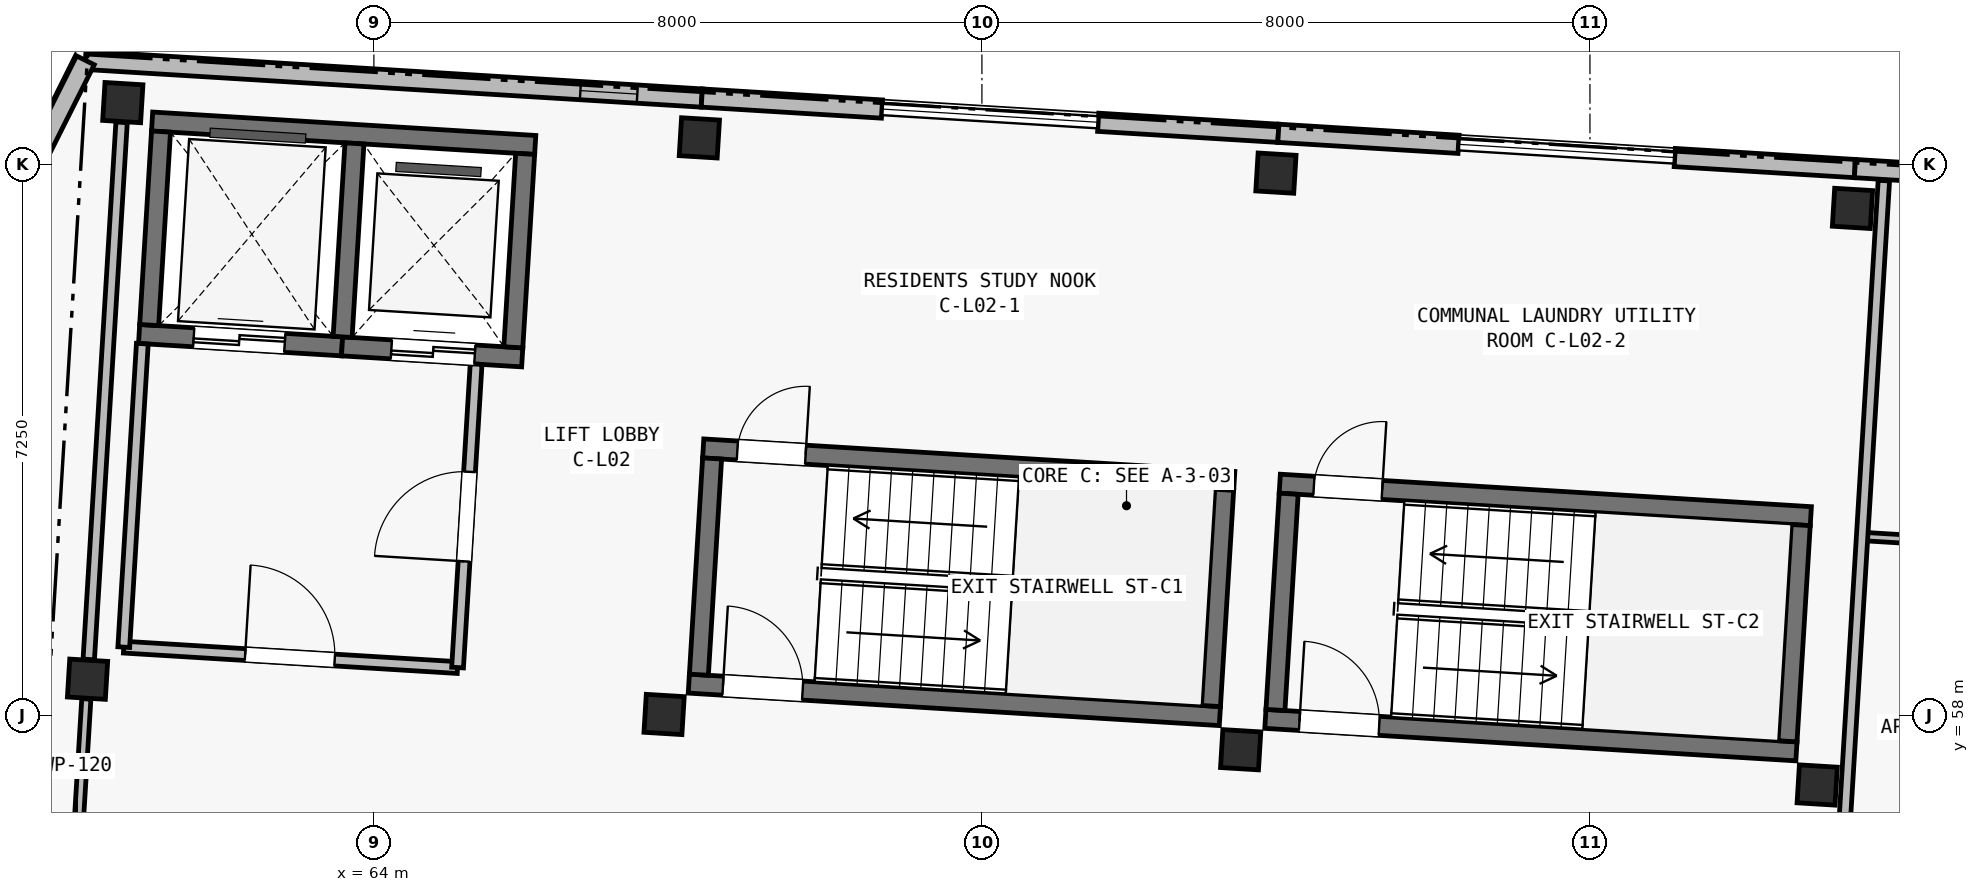
"""IFC4 building model, lengths in metres.
Left out: names, types, materials, properties, quantities, classifications, styles, units other than length and angle.
Written with IfcOpenShell. Run it as: python <this file> out.ifc"""

import sys

from ifc_helpers import new_model, si_unit, direction, frame, frame_2d, origin, origin_2d, place, context, subcontext, project, spatial, rectangle, extrude, element, fill, save


model = new_model("IFC4")
c1 = context("Model", 3, precision=1e-05, world=origin(), true_north=direction((0.0, 1.0)))
c2 = subcontext(c1, "Body", "Model", "MODEL_VIEW")
j1 = project(units=[si_unit("LENGTHUNIT", "METRE"), si_unit("PLANEANGLEUNIT", "RADIAN")], contexts=[c1])
p1 = place(None, origin())
s1 = spatial("IfcSite", under=j1, at=p1, CompositionType="ELEMENT")
p2 = place(p1, origin())
s2 = spatial("IfcBuilding", under=s1, at=p2, CompositionType="ELEMENT")
p3 = place(p2, frame((0.0, 0.0, 8.4)))
s3 = spatial("IfcBuildingStorey", under=s2, at=p3, CompositionType="ELEMENT", Elevation=8.4)
for number, where, z_axis, x_axis in (
    (1, (60.233, 58.478, 0.0), (0.0, 0.0, 1.0), (0.998, -0.061, 0.0)),
    (2, (60.697, 66.063, 0.0), (0.0, 0.0, 1.0), (0.998, -0.061, 0.0)),
    (3, (67.818, 58.014, 0.0), (0.0, 0.0, 1.0), (0.998, -0.061, 0.0)),
    (4, (68.282, 65.599, 0.0), (0.0, 0.0, 1.0), (0.998, -0.061, 0.0)),
    (5, (75.404, 57.55, 0.0), (0.0, 0.0, 1.0), (0.998, -0.061, 0.0)),
    (6, (75.868, 65.135, 0.0), (0.0, 0.0, 1.0), (0.998, -0.061, 0.0)),
    (7, (82.99, 57.086, 0.0), (0.0, 0.0, 1.0), (0.998, -0.061, 0.0)),
    (8, (83.454, 64.672, 0.0), (0.0, 0.0, 1.0), (0.998, -0.061, 0.0)),
):
    element("IfcColumn", number, at=place(p3, frame(where, z_axis=z_axis, x_axis=x_axis)), inside=s3, PredefinedType="COLUMN", context=c2, shape_type="SweptSolid", body=[
        extrude(rectangle(XDim=0.5, YDim=0.5, at=origin_2d()), origin(), (0.0, 0.0, 1.0), 3.25),
    ])
p4 = place(p3, frame((61.082, 65.814, 0.0), z_axis=(0.0, 0.0, 1.0), x_axis=(0.998134101522, -0.061059932685, 0.0)))
e9 = element("IfcWall", 9, at=p4, inside=s3, PredefinedType="SHEAR", context=c2, shape_type="SweptSolid", body=[
    extrude(rectangle(XDim=5.05, YDim=0.25, at=frame_2d((2.525, 0.0))), origin(), (0.0, 0.0, 1.0), 3.25),
])
p5 = place(p3, frame((60.911, 63.02, 0.0), z_axis=(0.0, 0.0, 1.0), x_axis=(0.998134099905, -0.061059959111, 0.0)))
e10 = element("IfcWall", 10, at=p5, inside=s3, PredefinedType="SHEAR", context=c2, shape_type="SweptSolid", body=[
    extrude(rectangle(XDim=2.675, YDim=0.25, at=frame_2d((1.337, 0.0))), origin(), (0.0, 0.0, 1.0), 3.25),
])
p6 = place(p5, frame((0.72, 0.0, 0.0)))
e11 = element("IfcOpeningElement", 11, at=p6, cuts=e10, PredefinedType="OPENING", context=c2, shape_type="SweptSolid", body=[
    extrude(rectangle(XDim=1.2, YDim=2.2, at=frame_2d((0.6, 1.1))), frame((0.0, 0.14, 0.0), z_axis=(0.0, -1.0, 0.0), x_axis=(1.0, 0.0, 0.0)), (0.0, 0.0, 1.0), 0.28),
])
p7 = place(p3, frame((63.581, 62.856, 0.0), z_axis=(0.0, 0.0, 1.0), x_axis=(0.998134103342, -0.061059902923, 0.0)))
e12 = element("IfcWall", 12, at=p7, inside=s3, PredefinedType="SHEAR", context=c2, shape_type="SweptSolid", body=[
    extrude(rectangle(XDim=2.375, YDim=0.25, at=frame_2d((1.188, 0.0))), origin(), (0.0, 0.0, 1.0), 3.25),
])
p8 = place(p7, frame((0.65, 0.0, 0.0)))
e13 = element("IfcOpeningElement", 13, at=p8, cuts=e12, PredefinedType="OPENING", context=c2, shape_type="SweptSolid", body=[
    extrude(rectangle(XDim=1.1, YDim=2.15, at=frame_2d((0.55, 1.075))), frame((0.0, 0.14, 0.0), z_axis=(0.0, -1.0, 0.0), x_axis=(1.0, 0.0, 0.0)), (0.0, 0.0, 1.0), 0.28),
])
p9 = place(p3, frame((61.043, 63.137, 0.0), z_axis=(0.0, 0.0, 1.0), x_axis=(0.061078919587, 0.998132939834, 0.0)))
e14 = element("IfcWall", 14, at=p9, inside=s3, PredefinedType="SHEAR", context=c2, shape_type="SweptSolid", body=[
    extrude(rectangle(XDim=2.55, YDim=0.25, at=frame_2d((1.275, 0.0))), origin(), (0.0, 0.0, 1.0), 3.25),
])
p10 = place(p3, frame((63.589, 62.981, 0.0), z_axis=(0.0, 0.0, 1.0), x_axis=(0.060989368901, 0.998138415692, 0.0)))
e15 = element("IfcWall", 15, at=p10, inside=s3, PredefinedType="SHEAR", context=c2, shape_type="SweptSolid", body=[
    extrude(rectangle(XDim=2.55, YDim=0.25, at=frame_2d((1.275, 0.0))), origin(), (0.0, 0.0, 1.0), 3.25),
])
p11 = place(p3, frame((65.834, 62.844, 0.0), z_axis=(0.0, 0.0, 1.0), x_axis=(0.061084756616, 0.998132582631, 0.0)))
e16 = element("IfcWall", 16, at=p11, inside=s3, PredefinedType="SHEAR", context=c2, shape_type="SweptSolid", body=[
    extrude(rectangle(XDim=2.55, YDim=0.25, at=frame_2d((1.275, 0.0))), origin(), (0.0, 0.0, 1.0), 3.25),
])
p12 = place(p3, frame((68.333, 61.514, 0.0), z_axis=(0.0, 0.0, 1.0), x_axis=(0.998135676081, -0.061034188237, 0.0)))
e17 = element("IfcWall", 17, at=p12, inside=s3, PredefinedType="SHEAR", context=c2, shape_type="SweptSolid", body=[
    extrude(rectangle(XDim=7.0, YDim=0.25, at=frame_2d((3.5, 0.0))), origin(), (0.0, 0.0, 1.0), 3.25),
])
p13 = place(p12, frame((0.45, 0.0, 0.0)))
e18 = element("IfcOpeningElement", 18, at=p13, cuts=e17, PredefinedType="OPENING", context=c2, shape_type="SweptSolid", body=[
    extrude(rectangle(XDim=0.9, YDim=2.1, at=frame_2d((0.45, 1.05))), frame((0.0, 0.14, 0.0), z_axis=(0.0, -1.0, 0.0), x_axis=(1.0, 0.0, 0.0)), (0.0, 0.0, 1.0), 0.28),
])
p14 = place(p3, frame((68.144, 58.419, 0.0), z_axis=(0.0, 0.0, 1.0), x_axis=(0.998135546153, -0.061036313012, 0.0)))
e19 = element("IfcWall", 19, at=p14, inside=s3, PredefinedType="SHEAR", context=c2, shape_type="SweptSolid", body=[
    extrude(rectangle(XDim=7.0, YDim=0.25, at=frame_2d((3.5, 0.0))), origin(), (0.0, 0.0, 1.0), 3.25),
])
p15 = place(p14, frame((0.45, 0.0, 0.0)))
e20 = element("IfcOpeningElement", 20, at=p15, cuts=e19, PredefinedType="OPENING", context=c2, shape_type="SweptSolid", body=[
    extrude(rectangle(XDim=1.05, YDim=2.15, at=frame_2d((0.525, 1.075))), frame((0.0, 0.14, 0.0), z_axis=(0.0, -1.0, 0.0), x_axis=(1.0, 0.0, 0.0)), (0.0, 0.0, 1.0), 0.28),
])
for number, where, z_axis, x_axis in (
    (21, (68.276, 58.537, 0.0), (0.0, 0.0, 1.0), (0.061, 0.998, 0.0)),
    (22, (75.014, 58.125, 0.0), (0.0, 0.0, 1.0), (0.061, 0.998, 0.0)),
):
    element("IfcWall", number, at=place(p3, frame(where, z_axis=z_axis, x_axis=x_axis)), inside=s3, PredefinedType="SHEAR", context=c2, shape_type="SweptSolid", body=[
        extrude(rectangle(XDim=2.85, YDim=0.25, at=frame_2d((1.425, 0.0))), origin(), (0.0, 0.0, 1.0), 3.25),
    ])
p16 = place(p3, frame((75.919, 61.05, 0.0), z_axis=(0.0, 0.0, 1.0), x_axis=(0.998135546153, -0.061036313012, 0.0)))
e23 = element("IfcWall", 23, at=p16, inside=s3, PredefinedType="SHEAR", context=c2, shape_type="SweptSolid", body=[
    extrude(rectangle(XDim=7.0, YDim=0.25, at=frame_2d((3.5, 0.0))), origin(), (0.0, 0.0, 1.0), 3.25),
])
p17 = place(p16, frame((0.45, 0.0, 0.0)))
e24 = element("IfcOpeningElement", 24, at=p17, cuts=e23, PredefinedType="OPENING", context=c2, shape_type="SweptSolid", body=[
    extrude(rectangle(XDim=0.9, YDim=2.1, at=frame_2d((0.45, 1.05))), frame((0.0, 0.14, 0.0), z_axis=(0.0, -1.0, 0.0), x_axis=(1.0, 0.0, 0.0)), (0.0, 0.0, 1.0), 0.28),
])
p18 = place(p3, frame((75.73, 57.956, 0.0), z_axis=(0.0, 0.0, 1.0), x_axis=(0.998135546153, -0.061036313012, 0.0)))
e25 = element("IfcWall", 25, at=p18, inside=s3, PredefinedType="SHEAR", context=c2, shape_type="SweptSolid", body=[
    extrude(rectangle(XDim=7.0, YDim=0.25, at=frame_2d((3.5, 0.0))), origin(), (0.0, 0.0, 1.0), 3.25),
])
p19 = place(p18, frame((0.45, 0.0, 0.0)))
e26 = element("IfcOpeningElement", 26, at=p19, cuts=e25, PredefinedType="OPENING", context=c2, shape_type="SweptSolid", body=[
    extrude(rectangle(XDim=1.05, YDim=2.15, at=frame_2d((0.525, 1.075))), frame((0.0, 0.14, 0.0), z_axis=(0.0, -1.0, 0.0), x_axis=(1.0, 0.0, 0.0)), (0.0, 0.0, 1.0), 0.28),
])
for number, where, z_axis, x_axis in (
    (27, (75.862, 58.073, 0.0), (0.0, 0.0, 1.0), (0.061, 0.998, 0.0)),
    (28, (82.599, 57.661, 0.0), (0.0, 0.0, 1.0), (0.061, 0.998, 0.0)),
):
    element("IfcWall", number, at=place(p3, frame(where, z_axis=z_axis, x_axis=x_axis)), inside=s3, PredefinedType="SHEAR", context=c2, shape_type="SweptSolid", body=[
        extrude(rectangle(XDim=2.85, YDim=0.25, at=frame_2d((1.425, 0.0))), origin(), (0.0, 0.0, 1.0), 3.25),
    ])
p20 = place(p3, frame((60.205, 66.62, 0.0), z_axis=(0.0, 0.0, 1.0), x_axis=(0.998134248939, -0.061057522844, 0.0)))
e29 = element("IfcWall", 29, at=p20, inside=s3, PredefinedType="SOLIDWALL", context=c2, shape_type="SweptSolid", body=[
    extrude(rectangle(XDim=8.125, YDim=0.24, at=frame_2d((4.062, 0.0))), origin(), (0.0, 0.0, 1.0), 3.0),
])
p21 = place(p20, frame((6.525, 0.0, 0.45)))
e30 = element("IfcOpeningElement", 30, at=p21, cuts=e29, PredefinedType="OPENING", context=c2, shape_type="SweptSolid", body=[
    extrude(rectangle(XDim=0.75, YDim=2.32, at=frame_2d((0.375, 1.16))), frame((0.0, 0.135, 0.0), z_axis=(0.0, -1.0, 0.0), x_axis=(1.0, 0.0, 0.0)), (0.0, 0.0, 1.0), 0.27),
])
p22 = place(p3, frame((68.314, 66.124, 0.0), z_axis=(0.0, 0.0, 1.0), x_axis=(0.998134103342, -0.061059902923, 0.0)))
e31 = element("IfcWall", 31, at=p22, inside=s3, PredefinedType="SOLIDWALL", context=c2, shape_type="SweptSolid", body=[
    extrude(rectangle(XDim=2.375, YDim=0.24, at=frame_2d((1.188, 0.0))), origin(), (0.0, 0.0, 1.0), 3.0),
])
p23 = place(p3, frame((73.53, 65.804, 0.0), z_axis=(0.0, 0.0, 1.0), x_axis=(0.998133720034, -0.061066168473, 0.0)))
e32 = element("IfcWall", 32, at=p23, inside=s3, PredefinedType="SOLIDWALL", context=c2, shape_type="SweptSolid", body=[
    extrude(rectangle(XDim=2.375, YDim=0.24, at=frame_2d((1.188, 0.0))), origin(), (0.0, 0.0, 1.0), 3.0),
])
for number, where, z_axis, x_axis in (
    (33, (75.9, 65.659, 0.0), (0.0, 0.0, 1.0), (0.998, -0.061, 0.0)),
    (34, (81.115, 65.341, 0.0), (0.0, 0.0, 1.0), (0.998, -0.061, 0.0)),
):
    element("IfcWall", number, at=place(p3, frame(where, z_axis=z_axis, x_axis=x_axis)), inside=s3, PredefinedType="SOLIDWALL", context=c2, shape_type="SweptSolid", body=[
        extrude(rectangle(XDim=2.375, YDim=0.24, at=frame_2d((1.188, 0.0))), origin(), (0.0, 0.0, 1.0), 3.0),
    ])
p24 = place(p3, frame((83.486, 65.196, 0.0), z_axis=(0.0, 0.0, 1.0), x_axis=(0.998135669243, -0.061034300063, 0.0)))
e35 = element("IfcWall", 35, at=p24, inside=s3, PredefinedType="SOLIDWALL", context=c2, shape_type="SweptSolid", body=[
    extrude(rectangle(XDim=7.6, YDim=0.24, at=frame_2d((3.8, 0.0))), origin(), (0.0, 0.0, 1.0), 3.0),
])
p25 = place(p24, frame((1.807, 0.0, 0.5)))
e36 = element("IfcOpeningElement", 36, at=p25, cuts=e35, PredefinedType="OPENING", context=c2, shape_type="SweptSolid", body=[
    extrude(rectangle(XDim=0.74, YDim=2.26, at=frame_2d((0.37, 1.13))), frame((0.0, 0.135, 0.0), z_axis=(0.0, -1.0, 0.0), x_axis=(1.0, 0.0, 0.0)), (0.0, 0.0, 1.0), 0.27),
])
p26 = place(p24, frame((5.006, 0.0, 0.44)))
e37 = element("IfcOpeningElement", 37, at=p26, cuts=e35, PredefinedType="OPENING", context=c2, shape_type="SweptSolid", body=[
    extrude(rectangle(XDim=0.82, YDim=2.18, at=frame_2d((0.41, 1.09))), frame((0.0, 0.135, 0.0), z_axis=(0.0, -1.0, 0.0), x_axis=(1.0, 0.0, 0.0)), (0.0, 0.0, 1.0), 0.27),
])
p27 = place(p3, frame((51.654, 49.585, 0.0), z_axis=(0.0, 0.0, 1.0), x_axis=(0.448621989068, 0.893721607059, 0.0)))
e38 = element("IfcWall", 38, at=p27, inside=s3, PredefinedType="SOLIDWALL", context=c2, shape_type="SweptSolid", body=[
    extrude(rectangle(XDim=19.061, YDim=0.26, at=frame_2d((9.53, 0.0))), origin(), (0.0, 0.0, 1.0), 3.0),
])
p28 = place(p27, frame((2.81, 0.0, 0.45)))
e39 = element("IfcOpeningElement", 39, at=p28, cuts=e38, PredefinedType="OPENING", context=c2, shape_type="SweptSolid", body=[
    extrude(rectangle(XDim=0.64, YDim=2.18, at=frame_2d((0.32, 1.09))), frame((0.0, 0.145, 0.0), z_axis=(0.0, -1.0, 0.0), x_axis=(1.0, 0.0, 0.0)), (0.0, 0.0, 1.0), 0.29),
])
p29 = place(p27, frame((15.47, 0.0, 0.52)))
e40 = element("IfcOpeningElement", 40, at=p29, cuts=e38, PredefinedType="OPENING", context=c2, shape_type="SweptSolid", body=[
    extrude(rectangle(XDim=0.78, YDim=2.2, at=frame_2d((0.39, 1.1))), frame((0.0, 0.145, 0.0), z_axis=(0.0, -1.0, 0.0), x_axis=(1.0, 0.0, 0.0)), (0.0, 0.0, 1.0), 0.29),
])
p30 = place(p3, frame((60.709, 58.899, 0.0), z_axis=(0.0, 0.0, 1.0), x_axis=(0.998132276607, -0.061089756882, 0.0)))
e41 = element("IfcWall", 41, at=p30, inside=s3, PredefinedType="PARTITIONING", context=c2, shape_type="SweptSolid", body=[
    extrude(rectangle(XDim=4.4, YDim=0.155, at=frame_2d((2.2, 0.0))), origin(), (0.0, 0.0, 1.0), 2.97),
])
p31 = place(p30, frame((1.6, 0.0, 0.0)))
e42 = element("IfcOpeningElement", 42, at=p31, cuts=e41, PredefinedType="OPENING", context=c2, shape_type="SweptSolid", body=[
    extrude(rectangle(XDim=1.18, YDim=2.15, at=frame_2d((0.59, 1.075))), frame((0.0, 0.093, 0.0), z_axis=(0.0, -1.0, 0.0), x_axis=(1.0, 0.0, 0.0)), (0.0, 0.0, 1.0), 0.185),
])
p32 = place(p3, frame((60.709, 58.899, 0.0), z_axis=(0.0, 0.0, 1.0), x_axis=(0.061036844229, 0.998135513669, 0.0)))
e43 = element("IfcWall", 43, at=p32, inside=s3, PredefinedType="PARTITIONING", context=c2, shape_type="SweptSolid", body=[
    extrude(rectangle(XDim=4.0, YDim=0.155, at=frame_2d((2.0, 0.0))), origin(), (0.0, 0.0, 1.0), 2.97),
])
p33 = place(p3, frame((65.101, 58.631, 0.0), z_axis=(0.0, 0.0, 1.0), x_axis=(0.061033125904, 0.99813574104, 0.0)))
e44 = element("IfcWall", 44, at=p33, inside=s3, PredefinedType="PARTITIONING", context=c2, shape_type="SweptSolid", body=[
    extrude(rectangle(XDim=4.0, YDim=0.155, at=frame_2d((2.0, 0.0))), origin(), (0.0, 0.0, 1.0), 2.97),
])
p34 = place(p33, frame((1.4, 0.0, 0.0)))
e45 = element("IfcOpeningElement", 45, at=p34, cuts=e44, PredefinedType="OPENING", context=c2, shape_type="SweptSolid", body=[
    extrude(rectangle(XDim=1.18, YDim=2.15, at=frame_2d((0.59, 1.075))), frame((0.0, 0.093, 0.0), z_axis=(0.0, -1.0, 0.0), x_axis=(1.0, 0.0, 0.0)), (0.0, 0.0, 1.0), 0.185),
])
p35 = place(p3, frame((59.98, 54.345, 0.0), z_axis=(0.0, 0.0, 1.0), x_axis=(0.061101107425, 0.998131581843, 0.0)))
e46 = element("IfcWall", 46, at=p35, inside=s3, PredefinedType="PARTITIONING", context=c2, shape_type="SweptSolid", body=[
    extrude(rectangle(XDim=3.88, YDim=0.12, at=frame_2d((1.94, 0.0))), origin(), (0.0, 0.0, 1.0), 2.5),
])
p36 = place(p35, frame((1.35, 0.0, 0.0)))
e47 = element("IfcOpeningElement", 47, at=p36, cuts=e46, PredefinedType="OPENING", context=c2, shape_type="SweptSolid", body=[
    extrude(rectangle(XDim=0.88, YDim=2.1, at=frame_2d((0.44, 1.05))), frame((0.0, 0.075, 0.0), z_axis=(0.0, -1.0, 0.0), x_axis=(1.0, 0.0, 0.0)), (0.0, 0.0, 1.0), 0.15),
])
p37 = place(p3, frame((60.249, 58.737, 0.0), z_axis=(0.0, 0.0, 1.0), x_axis=(0.061034344288, 0.998135666539, 0.0)))
e48 = element("IfcWall", 48, at=p37, inside=s3, PredefinedType="PARTITIONING", context=c2, shape_type="SweptSolid", body=[
    extrude(rectangle(XDim=7.08, YDim=0.15, at=frame_2d((3.54, 0.0))), origin(), (0.0, 0.0, 1.0), 2.5),
])
p38 = place(p3, frame((83.581, 60.356, 0.0), z_axis=(0.0, 0.0, 1.0), x_axis=(0.998133350094, -0.061072214879, 0.0)))
e49 = element("IfcWall", 49, at=p38, inside=s3, PredefinedType="PARTITIONING", context=c2, shape_type="SweptSolid", body=[
    extrude(rectangle(XDim=3.41, YDim=0.11, at=frame_2d((1.705, 0.0))), origin(), (0.0, 0.0, 1.0), 2.97),
])
p39 = place(p38, frame((1.255, 0.0, 0.0)))
e50 = element("IfcOpeningElement", 50, at=p39, cuts=e49, PredefinedType="OPENING", context=c2, shape_type="SweptSolid", body=[
    extrude(rectangle(XDim=0.9, YDim=2.1, at=frame_2d((0.45, 1.05))), frame((0.0, 0.07, 0.0), z_axis=(0.0, -1.0, 0.0), x_axis=(1.0, 0.0, 0.0)), (0.0, 0.0, 1.0), 0.14),
])
p40 = place(p3, frame((83.265, 55.185, 0.0), z_axis=(0.0, 0.0, 1.0), x_axis=(0.061046193261, 0.998134941923, 0.0)))
e51 = element("IfcWall", 51, at=p40, inside=s3, PredefinedType="PARTITIONING", context=c2, shape_type="SweptSolid", body=[
    extrude(rectangle(XDim=9.87, YDim=0.15, at=frame_2d((4.935, 0.0))), origin(), (0.0, 0.0, 1.0), 2.97),
])
p41 = place(p21, origin())
e52 = element("IfcWindow", 52, at=p41, inside=s3, PartitioningType="SINGLE_PANEL", PredefinedType="WINDOW", context=c2, shape_type="SweptSolid", body=[
    extrude(rectangle(XDim=0.75, YDim=2.32, at=frame_2d((0.375, 1.16))), frame((0.0, 0.03, 0.0), z_axis=(0.0, -1.0, 0.0), x_axis=(1.0, 0.0, 0.0)), (0.0, 0.0, 1.0), 0.06),
])
fill(e30, e52)
p42 = place(p31, origin())
e53 = element("IfcDoor", 53, at=p42, inside=s3, OperationType="SINGLE_SWING_LEFT", PredefinedType="DOOR", context=c2, shape_type="SweptSolid", body=[
    extrude(rectangle(XDim=1.18, YDim=2.15, at=frame_2d((0.59, 1.075))), frame((0.0, 0.025, 0.0), z_axis=(0.0, -1.0, 0.0), x_axis=(1.0, 0.0, 0.0)), (0.0, 0.0, 1.0), 0.05),
])
fill(e42, e53)
p43 = place(p34, origin())
e54 = element("IfcDoor", 54, at=p43, inside=s3, OperationType="SINGLE_SWING_LEFT", PredefinedType="DOOR", context=c2, shape_type="SweptSolid", body=[
    extrude(rectangle(XDim=1.18, YDim=2.15, at=frame_2d((0.59, 1.075))), frame((0.0, 0.025, 0.0), z_axis=(0.0, -1.0, 0.0), x_axis=(1.0, 0.0, 0.0)), (0.0, 0.0, 1.0), 0.05),
])
fill(e45, e54)
p44 = place(p15, origin())
e55 = element("IfcDoor", 55, at=p44, inside=s3, OperationType="SINGLE_SWING_LEFT", PredefinedType="DOOR", context=c2, shape_type="SweptSolid", body=[
    extrude(rectangle(XDim=1.05, YDim=2.15, at=frame_2d((0.525, 1.075))), frame((0.0, 0.025, 0.0), z_axis=(0.0, -1.0, 0.0), x_axis=(1.0, 0.0, 0.0)), (0.0, 0.0, 1.0), 0.05),
])
fill(e20, e55)
p45 = place(p13, origin())
e56 = element("IfcDoor", 56, at=p45, inside=s3, OperationType="SINGLE_SWING_RIGHT", PredefinedType="DOOR", context=c2, shape_type="SweptSolid", body=[
    extrude(rectangle(XDim=0.9, YDim=2.1, at=frame_2d((0.45, 1.05))), frame((0.0, 0.025, 0.0), z_axis=(0.0, -1.0, 0.0), x_axis=(1.0, 0.0, 0.0)), (0.0, 0.0, 1.0), 0.05),
])
fill(e18, e56)
p46 = place(p19, origin())
e57 = element("IfcDoor", 57, at=p46, inside=s3, OperationType="SINGLE_SWING_LEFT", PredefinedType="DOOR", context=c2, shape_type="SweptSolid", body=[
    extrude(rectangle(XDim=1.05, YDim=2.15, at=frame_2d((0.525, 1.075))), frame((0.0, 0.025, 0.0), z_axis=(0.0, -1.0, 0.0), x_axis=(1.0, 0.0, 0.0)), (0.0, 0.0, 1.0), 0.05),
])
fill(e26, e57)
p47 = place(p17, origin())
e58 = element("IfcDoor", 58, at=p47, inside=s3, OperationType="SINGLE_SWING_RIGHT", PredefinedType="DOOR", context=c2, shape_type="SweptSolid", body=[
    extrude(rectangle(XDim=0.9, YDim=2.1, at=frame_2d((0.45, 1.05))), frame((0.0, 0.025, 0.0), z_axis=(0.0, -1.0, 0.0), x_axis=(1.0, 0.0, 0.0)), (0.0, 0.0, 1.0), 0.05),
])
fill(e24, e58)
p48 = place(p6, origin())
e59 = element("IfcDoor", 59, at=p48, inside=s3, OperationType="DOUBLE_DOOR_SLIDING", PredefinedType="DOOR", context=c2, shape_type="SweptSolid", body=[
    extrude(rectangle(XDim=1.2, YDim=2.2, at=frame_2d((0.6, 1.1))), frame((0.0, 0.025, 0.0), z_axis=(0.0, -1.0, 0.0), x_axis=(1.0, 0.0, 0.0)), (0.0, 0.0, 1.0), 0.05),
])
fill(e11, e59)
p49 = place(p8, origin())
e60 = element("IfcDoor", 60, at=p49, inside=s3, OperationType="DOUBLE_DOOR_SLIDING", PredefinedType="DOOR", context=c2, shape_type="SweptSolid", body=[
    extrude(rectangle(XDim=1.1, YDim=2.15, at=frame_2d((0.55, 1.075))), frame((0.0, 0.025, 0.0), z_axis=(0.0, -1.0, 0.0), x_axis=(1.0, 0.0, 0.0)), (0.0, 0.0, 1.0), 0.05),
])
fill(e13, e60)
save(model, sys.argv[1])
